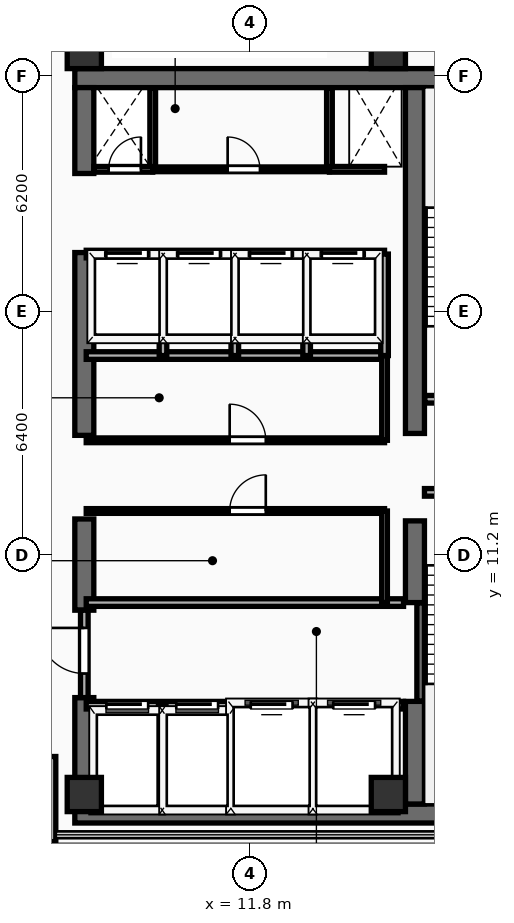
"""IFC4 building model, lengths in metres.
Left out: names, types, materials, properties, quantities, classifications, styles, units other than length and angle.
Written with IfcOpenShell. Run it as: python <this file> out.ifc"""

import sys

from ifc_helpers import new_model, si_unit, direction, frame, frame_2d, origin, origin_2d, place, context, subcontext, project, spatial, rectangle, extrude, element, fill, save


model = new_model("IFC4")
c1 = context("Model", 3, precision=1e-05, world=origin(), true_north=direction((0.0, 1.0)))
c2 = subcontext(c1, "Body", "Model", "MODEL_VIEW")
j1 = project(units=[si_unit("LENGTHUNIT", "METRE"), si_unit("PLANEANGLEUNIT", "RADIAN")], contexts=[c1])
p1 = place(None, origin())
s1 = spatial("IfcSite", under=j1, at=p1, CompositionType="ELEMENT")
p2 = place(p1, origin())
s2 = spatial("IfcBuilding", under=s1, at=p2, CompositionType="ELEMENT")
p3 = place(p2, frame((0.0, 0.0, 344.2)))
s3 = spatial("IfcBuildingStorey", under=s2, at=p3, CompositionType="ELEMENT", Elevation=344.2)
for number, where, z_axis, x_axis in (
    (1, (7.2, 4.4, 0.0), (0.0, 0.0, 1.0), (1.0, 0.0, 0.0)),
    (2, (7.2, 23.75, 0.0), (0.0, 0.0, 1.0), (1.0, 0.0, 0.0)),
):
    element("IfcWall", number, at=place(p3, frame(where, z_axis=z_axis, x_axis=x_axis)), inside=s3, PredefinedType="SHEAR", context=c2, shape_type="SweptSolid", body=[
        extrude(rectangle(XDim=13.85, YDim=0.5, at=frame_2d((6.925, 0.0))), origin(), (0.0, 0.0, 1.0), 3.66),
    ])
p4 = place(p3, frame((7.45, 4.65, 0.0), z_axis=(0.0, 0.0, 1.0), x_axis=(0.0, 1.0, 0.0)))
e3 = element("IfcWall", 3, at=p4, inside=s3, PredefinedType="SHEAR", context=c2, shape_type="SweptSolid", body=[
    extrude(rectangle(XDim=2.8, YDim=0.5, at=frame_2d((1.4, 0.0))), origin(), (0.0, 0.0, 1.0), 3.66),
])
p5 = place(p3, frame((7.45, 9.75, 0.0), z_axis=(0.0, 0.0, 1.0), x_axis=(0.0, 1.0, 0.0)))
e4 = element("IfcWall", 4, at=p5, inside=s3, PredefinedType="SHEAR", context=c2, shape_type="SweptSolid", body=[
    extrude(rectangle(XDim=2.4, YDim=0.5, at=frame_2d((1.2, 0.0))), origin(), (0.0, 0.0, 1.0), 3.66),
])
p6 = place(p3, frame((7.45, 14.35, 0.0), z_axis=(0.0, 0.0, 1.0), x_axis=(0.0, 1.0, 0.0)))
e5 = element("IfcWall", 5, at=p6, inside=s3, PredefinedType="SHEAR", context=c2, shape_type="SweptSolid", body=[
    extrude(rectangle(XDim=4.81, YDim=0.5, at=frame_2d((2.405, 0.0))), origin(), (0.0, 0.0, 1.0), 3.66),
])
p7 = place(p3, frame((7.45, 21.24, 0.0), z_axis=(0.0, 0.0, 1.0), x_axis=(0.0, 1.0, 0.0)))
e6 = element("IfcWall", 6, at=p7, inside=s3, PredefinedType="SHEAR", context=c2, shape_type="SweptSolid", body=[
    extrude(rectangle(XDim=2.26, YDim=0.5, at=frame_2d((1.13, 0.0))), origin(), (0.0, 0.0, 1.0), 3.66),
])
p8 = place(p3, frame((16.15, 4.65, 0.0), z_axis=(0.0, 0.0, 1.0), x_axis=(0.0, 1.0, 0.0)))
e7 = element("IfcWall", 7, at=p8, inside=s3, PredefinedType="SHEAR", context=c2, shape_type="SweptSolid", body=[
    extrude(rectangle(XDim=2.7, YDim=0.5, at=frame_2d((1.35, 0.0))), origin(), (0.0, 0.0, 1.0), 3.66),
])
p9 = place(p3, frame((16.15, 9.95, 0.0), z_axis=(0.0, 0.0, 1.0), x_axis=(0.0, 1.0, 0.0)))
e8 = element("IfcWall", 8, at=p9, inside=s3, PredefinedType="SHEAR", context=c2, shape_type="SweptSolid", body=[
    extrude(rectangle(XDim=2.15, YDim=0.5, at=frame_2d((1.075, 0.0))), origin(), (0.0, 0.0, 1.0), 3.66),
])
p10 = place(p3, frame((16.15, 14.4, 0.0), z_axis=(0.0, 0.0, 1.0), x_axis=(0.0, 1.0, 0.0)))
e9 = element("IfcWall", 9, at=p10, inside=s3, PredefinedType="SHEAR", context=c2, shape_type="SweptSolid", body=[
    extrude(rectangle(XDim=9.1, YDim=0.5, at=frame_2d((4.55, 0.0))), origin(), (0.0, 0.0, 1.0), 3.66),
])
for number, where, z_axis, x_axis in (
    (10, (7.45, 4.9, 0.0), (0.0, 0.0, 1.0), (1.0, 0.0, 0.0)),
    (11, (15.45, 4.9, 0.0), (0.0, 0.0, 1.0), (1.0, 0.0, 0.0)),
    (12, (7.45, 24.45, 0.0), (0.0, 0.0, 1.0), (1.0, 0.0, 0.0)),
    (13, (15.45, 24.45, 0.0), (0.0, 0.0, 1.0), (1.0, 0.0, 0.0)),
):
    element("IfcColumn", number, at=place(p3, frame(where, z_axis=z_axis, x_axis=x_axis)), inside=s3, PredefinedType="COLUMN", context=c2, shape_type="SweptSolid", body=[
        extrude(rectangle(XDim=0.9, YDim=0.9, at=origin_2d()), origin(), (0.0, 0.0, 1.0), 3.66),
    ])
p11 = place(p3, frame((6.56, 3.66, 0.0), z_axis=(0.0, 0.0, 1.0), x_axis=(0.0, 1.0, 0.0)))
e14 = element("IfcWall", 14, at=p11, inside=s3, PredefinedType="SOLIDWALL", context=c2, shape_type="SweptSolid", body=[
    extrude(rectangle(XDim=2.24, YDim=0.28, at=frame_2d((1.12, 0.0))), origin(), (0.0, 0.0, 1.0), 3.66),
])
p12 = place(p3, frame((16.3, 7.36, 0.0), z_axis=(0.0, 0.0, 1.0), x_axis=(0.0, 1.0, 0.0)))
e15 = element("IfcWall", 15, at=p12, inside=s3, PredefinedType="SHEAR", context=c2, shape_type="SweptSolid", body=[
    extrude(rectangle(XDim=2.58, YDim=0.2, at=frame_2d((1.29, 0.0))), origin(), (0.0, 0.0, 1.0), 3.66),
])
p13 = place(p3, frame((16.4, 12.85, 0.0), z_axis=(0.0, 0.0, 1.0), x_axis=(1.0, 0.0, 0.0)))
e16 = element("IfcWall", 16, at=p13, inside=s3, PredefinedType="PARTITIONING", context=c2, shape_type="SweptSolid", body=[
    extrude(rectangle(XDim=3.96, YDim=0.2, at=frame_2d((1.98, 0.0))), origin(), (0.0, 0.0, 1.0), 3.66),
])
p14 = place(p13, frame((1.304, 0.0, 0.0)))
e17 = element("IfcOpeningElement", 17, at=p14, cuts=e16, PredefinedType="OPENING", context=c2, shape_type="SweptSolid", body=[
    extrude(rectangle(XDim=1.1, YDim=2.2, at=frame_2d((0.55, 1.1))), frame((0.0, 0.11, 0.0), z_axis=(0.0, -1.0, 0.0), x_axis=(1.0, 0.0, 0.0)), (0.0, 0.0, 1.0), 0.22),
])
p15 = place(p3, frame((16.41, 15.3, 0.0), z_axis=(0.0, 0.0, 1.0), x_axis=(1.0, 0.0, 0.0)))
e18 = element("IfcWall", 18, at=p15, inside=s3, PredefinedType="PARTITIONING", context=c2, shape_type="SweptSolid", body=[
    extrude(rectangle(XDim=3.95, YDim=0.2, at=frame_2d((1.975, 0.0))), origin(), (0.0, 0.0, 1.0), 3.66),
])
p16 = place(p15, frame((1.294, 0.0, 0.0)))
e19 = element("IfcOpeningElement", 19, at=p16, cuts=e18, PredefinedType="OPENING", context=c2, shape_type="SweptSolid", body=[
    extrude(rectangle(XDim=1.1, YDim=2.2, at=frame_2d((0.55, 1.1))), frame((0.0, 0.11, 0.0), z_axis=(0.0, -1.0, 0.0), x_axis=(1.0, 0.0, 0.0)), (0.0, 0.0, 1.0), 0.22),
])
p17 = place(p3, frame((7.5, 7.25, 0.0), z_axis=(0.0, 0.0, 1.0), x_axis=(1.0, 0.0, 0.0)))
e20 = element("IfcWall", 20, at=p17, inside=s3, PredefinedType="PARTITIONING", context=c2, shape_type="SweptSolid", body=[
    extrude(rectangle(XDim=8.35, YDim=0.2, at=frame_2d((4.175, 0.0))), origin(), (0.0, 0.0, 1.0), 3.66),
])
p18 = place(p17, frame((0.53, 0.0, 0.0)))
e21 = element("IfcOpeningElement", 21, at=p18, cuts=e20, PredefinedType="OPENING", context=c2, shape_type="SweptSolid", body=[
    extrude(rectangle(XDim=1.1, YDim=2.2, at=frame_2d((0.55, 1.1))), frame((0.0, 0.11, 0.0), z_axis=(0.0, -1.0, 0.0), x_axis=(1.0, 0.0, 0.0)), (0.0, 0.0, 1.0), 0.22),
])
p19 = place(p17, frame((2.37, 0.0, 0.0)))
e22 = element("IfcOpeningElement", 22, at=p19, cuts=e20, PredefinedType="OPENING", context=c2, shape_type="SweptSolid", body=[
    extrude(rectangle(XDim=1.1, YDim=2.2, at=frame_2d((0.55, 1.1))), frame((0.0, 0.11, 0.0), z_axis=(0.0, -1.0, 0.0), x_axis=(1.0, 0.0, 0.0)), (0.0, 0.0, 1.0), 0.22),
])
p20 = place(p17, frame((4.33, 0.0, 0.0)))
e23 = element("IfcOpeningElement", 23, at=p20, cuts=e20, PredefinedType="OPENING", context=c2, shape_type="SweptSolid", body=[
    extrude(rectangle(XDim=1.1, YDim=2.2, at=frame_2d((0.55, 1.1))), frame((0.0, 0.11, 0.0), z_axis=(0.0, -1.0, 0.0), x_axis=(1.0, 0.0, 0.0)), (0.0, 0.0, 1.0), 0.22),
])
p21 = place(p17, frame((6.5, 0.0, 0.0)))
e24 = element("IfcOpeningElement", 24, at=p21, cuts=e20, PredefinedType="OPENING", context=c2, shape_type="SweptSolid", body=[
    extrude(rectangle(XDim=1.1, YDim=2.2, at=frame_2d((0.55, 1.1))), frame((0.0, 0.11, 0.0), z_axis=(0.0, -1.0, 0.0), x_axis=(1.0, 0.0, 0.0)), (0.0, 0.0, 1.0), 0.22),
])
p22 = place(p3, frame((7.5, 9.95, 0.0), z_axis=(0.0, 0.0, 1.0), x_axis=(1.0, 0.0, 0.0)))
e25 = element("IfcWall", 25, at=p22, inside=s3, PredefinedType="PARTITIONING", context=c2, shape_type="SweptSolid", body=[
    extrude(rectangle(XDim=8.35, YDim=0.2, at=frame_2d((4.175, 0.0))), origin(), (0.0, 0.0, 1.0), 3.66),
])
for number, where, z_axis, x_axis in (
    (26, (9.5, 4.45, 0.0), (0.0, 0.0, 1.0), (0.0, 1.0, 0.0)),
    (27, (11.36, 4.45, 0.0), (0.0, 0.0, 1.0), (0.0, 1.0, 0.0)),
    (28, (13.46, 4.45, 0.0), (0.0, 0.0, 1.0), (0.0, 1.0, 0.0)),
):
    element("IfcWall", number, at=place(p3, frame(where, z_axis=z_axis, x_axis=x_axis)), inside=s3, PredefinedType="PARTITIONING", context=c2, shape_type="SweptSolid", body=[
        extrude(rectangle(XDim=2.8, YDim=0.2, at=frame_2d((1.4, 0.0))), origin(), (0.0, 0.0, 1.0), 3.66),
    ])
p23 = place(p3, frame((7.45, 7.45, 0.0), z_axis=(0.0, 0.0, 1.0), x_axis=(0.0, 1.0, 0.0)))
e29 = element("IfcWall", 29, at=p23, inside=s3, PredefinedType="PARTITIONING", context=c2, shape_type="SweptSolid", body=[
    extrude(rectangle(XDim=2.3, YDim=0.2, at=frame_2d((1.15, 0.0))), origin(), (0.0, 0.0, 1.0), 2.64),
])
p24 = place(p23, frame((0.633, 0.0, 0.0)))
e30 = element("IfcOpeningElement", 30, at=p24, cuts=e29, PredefinedType="OPENING", context=c2, shape_type="SweptSolid", body=[
    extrude(rectangle(XDim=1.2, YDim=2.25, at=frame_2d((0.6, 1.125))), frame((0.0, 0.11, 0.0), z_axis=(0.0, -1.0, 0.0), x_axis=(1.0, 0.0, 0.0)), (0.0, 0.0, 1.0), 0.22),
])
p25 = place(p3, frame((7.5, 16.45, 0.0), z_axis=(0.0, 0.0, 1.0), x_axis=(1.0, 0.0, 0.0)))
e31 = element("IfcWall", 31, at=p25, inside=s3, PredefinedType="PARTITIONING", context=c2, shape_type="SweptSolid", body=[
    extrude(rectangle(XDim=7.85, YDim=0.2, at=frame_2d((3.925, 0.0))), origin(), (0.0, 0.0, 1.0), 3.66),
])
p26 = place(p3, frame((7.5, 12.36, 0.0), z_axis=(0.0, 0.0, 1.0), x_axis=(1.0, 0.0, 0.0)))
e32 = element("IfcWall", 32, at=p26, inside=s3, PredefinedType="PARTITIONING", context=c2, shape_type="SweptSolid", body=[
    extrude(rectangle(XDim=7.85, YDim=0.125, at=frame_2d((3.925, 0.0))), origin(), (0.0, 0.0, 1.0), 3.66),
])
p27 = place(p26, frame((3.775, 0.0, 0.0)))
e33 = element("IfcOpeningElement", 33, at=p27, cuts=e32, PredefinedType="OPENING", context=c2, shape_type="SweptSolid", body=[
    extrude(rectangle(XDim=0.95, YDim=2.15, at=frame_2d((0.475, 1.075))), frame((0.0, 0.073, 0.0), z_axis=(0.0, -1.0, 0.0), x_axis=(1.0, 0.0, 0.0)), (0.0, 0.0, 1.0), 0.145),
])
p28 = place(p3, frame((7.5, 14.22, 0.0), z_axis=(0.0, 0.0, 1.0), x_axis=(1.0, 0.0, 0.0)))
e34 = element("IfcWall", 34, at=p28, inside=s3, PredefinedType="PARTITIONING", context=c2, shape_type="SweptSolid", body=[
    extrude(rectangle(XDim=7.85, YDim=0.125, at=frame_2d((3.925, 0.0))), origin(), (0.0, 0.0, 1.0), 3.66),
])
p29 = place(p28, frame((3.775, 0.0, 0.0)))
e35 = element("IfcOpeningElement", 35, at=p29, cuts=e34, PredefinedType="OPENING", context=c2, shape_type="SweptSolid", body=[
    extrude(rectangle(XDim=0.95, YDim=2.15, at=frame_2d((0.475, 1.075))), frame((0.0, 0.073, 0.0), z_axis=(0.0, -1.0, 0.0), x_axis=(1.0, 0.0, 0.0)), (0.0, 0.0, 1.0), 0.145),
])
p30 = place(p3, frame((15.35, 9.95, 0.0), z_axis=(0.0, 0.0, 1.0), x_axis=(0.0, 1.0, 0.0)))
e36 = element("IfcWall", 36, at=p30, inside=s3, PredefinedType="PARTITIONING", context=c2, shape_type="SweptSolid", body=[
    extrude(rectangle(XDim=2.41, YDim=0.15, at=frame_2d((1.205, 0.0))), origin(), (0.0, 0.0, 1.0), 3.66),
])
p31 = place(p3, frame((15.35, 14.22, 0.0), z_axis=(0.0, 0.0, 1.0), x_axis=(0.0, 1.0, 0.0)))
e37 = element("IfcWall", 37, at=p31, inside=s3, PredefinedType="PARTITIONING", context=c2, shape_type="SweptSolid", body=[
    extrude(rectangle(XDim=2.23, YDim=0.15, at=frame_2d((1.115, 0.0))), origin(), (0.0, 0.0, 1.0), 3.66),
])
p32 = place(p3, frame((7.5, 19.12, 0.0), z_axis=(0.0, 0.0, 1.0), x_axis=(1.0, 0.0, 0.0)))
e38 = element("IfcWall", 38, at=p32, inside=s3, PredefinedType="PARTITIONING", context=c2, shape_type="SweptSolid", body=[
    extrude(rectangle(XDim=7.85, YDim=0.2, at=frame_2d((3.925, 0.0))), origin(), (0.0, 0.0, 1.0), 3.66),
])
p33 = place(p32, frame((0.53, 0.0, 0.0)))
e39 = element("IfcOpeningElement", 39, at=p33, cuts=e38, PredefinedType="OPENING", context=c2, shape_type="SweptSolid", body=[
    extrude(rectangle(XDim=1.1, YDim=2.2, at=frame_2d((0.55, 1.1))), frame((0.0, 0.11, 0.0), z_axis=(0.0, -1.0, 0.0), x_axis=(1.0, 0.0, 0.0)), (0.0, 0.0, 1.0), 0.22),
])
p34 = place(p32, frame((2.42, 0.0, 0.0)))
e40 = element("IfcOpeningElement", 40, at=p34, cuts=e38, PredefinedType="OPENING", context=c2, shape_type="SweptSolid", body=[
    extrude(rectangle(XDim=1.1, YDim=2.2, at=frame_2d((0.55, 1.1))), frame((0.0, 0.11, 0.0), z_axis=(0.0, -1.0, 0.0), x_axis=(1.0, 0.0, 0.0)), (0.0, 0.0, 1.0), 0.22),
])
p35 = place(p32, frame((4.31, 0.0, 0.0)))
e41 = element("IfcOpeningElement", 41, at=p35, cuts=e38, PredefinedType="OPENING", context=c2, shape_type="SweptSolid", body=[
    extrude(rectangle(XDim=1.1, YDim=2.2, at=frame_2d((0.55, 1.1))), frame((0.0, 0.11, 0.0), z_axis=(0.0, -1.0, 0.0), x_axis=(1.0, 0.0, 0.0)), (0.0, 0.0, 1.0), 0.22),
])
p36 = place(p32, frame((6.2, 0.0, 0.0)))
e42 = element("IfcOpeningElement", 42, at=p36, cuts=e38, PredefinedType="OPENING", context=c2, shape_type="SweptSolid", body=[
    extrude(rectangle(XDim=1.1, YDim=2.2, at=frame_2d((0.55, 1.1))), frame((0.0, 0.11, 0.0), z_axis=(0.0, -1.0, 0.0), x_axis=(1.0, 0.0, 0.0)), (0.0, 0.0, 1.0), 0.22),
])
for number, where, z_axis, x_axis in (
    (43, (15.35, 16.45, 0.0), (0.0, 0.0, 1.0), (0.0, 1.0, 0.0)),
    (44, (9.52, 16.45, 0.0), (0.0, 0.0, 1.0), (0.0, 1.0, 0.0)),
    (45, (11.41, 16.45, 0.0), (0.0, 0.0, 1.0), (0.0, 1.0, 0.0)),
    (46, (13.3, 16.45, 0.0), (0.0, 0.0, 1.0), (0.0, 1.0, 0.0)),
):
    element("IfcWall", number, at=place(p3, frame(where, z_axis=z_axis, x_axis=x_axis)), inside=s3, PredefinedType="PARTITIONING", context=c2, shape_type="SweptSolid", body=[
        extrude(rectangle(XDim=2.67, YDim=0.2, at=frame_2d((1.335, 0.0))), origin(), (0.0, 0.0, 1.0), 3.66),
    ])
for number, where, z_axis, x_axis in (
    (47, (9.25, 21.35, 0.0), (0.0, 0.0, 1.0), (0.0, 1.0, 0.0)),
    (48, (13.9, 21.35, 0.0), (0.0, 0.0, 1.0), (0.0, 1.0, 0.0)),
):
    element("IfcWall", number, at=place(p3, frame(where, z_axis=z_axis, x_axis=x_axis)), inside=s3, PredefinedType="PARTITIONING", context=c2, shape_type="SweptSolid", body=[
        extrude(rectangle(XDim=2.13, YDim=0.15, at=frame_2d((1.065, 0.0))), origin(), (0.0, 0.0, 1.0), 3.66),
    ])
p37 = place(p3, frame((7.7, 21.35, 0.0), z_axis=(0.0, 0.0, 1.0), x_axis=(1.0, 0.0, 0.0)))
e49 = element("IfcWall", 49, at=p37, inside=s3, PredefinedType="PARTITIONING", context=c2, shape_type="SweptSolid", body=[
    extrude(rectangle(XDim=1.55, YDim=0.15, at=frame_2d((0.775, 0.0))), origin(), (0.0, 0.0, 1.0), 3.66),
])
p38 = place(p37, frame((0.39, 0.0, 0.0)))
e50 = element("IfcOpeningElement", 50, at=p38, cuts=e49, PredefinedType="OPENING", context=c2, shape_type="SweptSolid", body=[
    extrude(rectangle(XDim=0.85, YDim=2.15, at=frame_2d((0.425, 1.075))), frame((0.0, 0.085, 0.0), z_axis=(0.0, -1.0, 0.0), x_axis=(1.0, 0.0, 0.0)), (0.0, 0.0, 1.0), 0.17),
])
p39 = place(p3, frame((13.9, 21.35, 0.0), z_axis=(0.0, 0.0, 1.0), x_axis=(1.0, 0.0, 0.0)))
e51 = element("IfcWall", 51, at=p39, inside=s3, PredefinedType="PARTITIONING", context=c2, shape_type="SweptSolid", body=[
    extrude(rectangle(XDim=1.45, YDim=0.15, at=frame_2d((0.725, 0.0))), origin(), (0.0, 0.0, 1.0), 3.66),
])
p40 = place(p3, frame((9.25, 21.35, 0.0), z_axis=(0.0, 0.0, 1.0), x_axis=(1.0, 0.0, 0.0)))
e52 = element("IfcWall", 52, at=p40, inside=s3, PredefinedType="PARTITIONING", context=c2, shape_type="SweptSolid", body=[
    extrude(rectangle(XDim=4.65, YDim=0.125, at=frame_2d((2.325, 0.0))), origin(), (0.0, 0.0, 1.0), 3.66),
])
p41 = place(p40, frame((1.971, 0.0, 0.0)))
e53 = element("IfcOpeningElement", 53, at=p41, cuts=e52, PredefinedType="OPENING", context=c2, shape_type="SweptSolid", body=[
    extrude(rectangle(XDim=0.85, YDim=2.15, at=frame_2d((0.425, 1.075))), frame((0.0, 0.073, 0.0), z_axis=(0.0, -1.0, 0.0), x_axis=(1.0, 0.0, 0.0)), (0.0, 0.0, 1.0), 0.145),
])
p42 = place(p18, origin())
e54 = element("IfcDoor", 54, at=p42, inside=s3, OperationType="SLIDING_TO_LEFT", PredefinedType="DOOR", context=c2, shape_type="SweptSolid", body=[
    extrude(rectangle(XDim=1.1, YDim=2.2, at=frame_2d((0.55, 1.1))), frame((0.0, 0.025, 0.0), z_axis=(0.0, -1.0, 0.0), x_axis=(1.0, 0.0, 0.0)), (0.0, 0.0, 1.0), 0.05),
])
fill(e21, e54)
p43 = place(p19, origin())
e55 = element("IfcDoor", 55, at=p43, inside=s3, OperationType="SLIDING_TO_LEFT", PredefinedType="DOOR", context=c2, shape_type="SweptSolid", body=[
    extrude(rectangle(XDim=1.1, YDim=2.2, at=frame_2d((0.55, 1.1))), frame((0.0, 0.025, 0.0), z_axis=(0.0, -1.0, 0.0), x_axis=(1.0, 0.0, 0.0)), (0.0, 0.0, 1.0), 0.05),
])
fill(e22, e55)
p44 = place(p20, origin())
e56 = element("IfcDoor", 56, at=p44, inside=s3, OperationType="SLIDING_TO_LEFT", PredefinedType="DOOR", context=c2, shape_type="SweptSolid", body=[
    extrude(rectangle(XDim=1.1, YDim=2.2, at=frame_2d((0.55, 1.1))), frame((0.0, 0.025, 0.0), z_axis=(0.0, -1.0, 0.0), x_axis=(1.0, 0.0, 0.0)), (0.0, 0.0, 1.0), 0.05),
])
fill(e23, e56)
p45 = place(p21, origin())
e57 = element("IfcDoor", 57, at=p45, inside=s3, OperationType="SLIDING_TO_LEFT", PredefinedType="DOOR", context=c2, shape_type="SweptSolid", body=[
    extrude(rectangle(XDim=1.1, YDim=2.2, at=frame_2d((0.55, 1.1))), frame((0.0, 0.025, 0.0), z_axis=(0.0, -1.0, 0.0), x_axis=(1.0, 0.0, 0.0)), (0.0, 0.0, 1.0), 0.05),
])
fill(e24, e57)
p46 = place(p24, frame((1.2, 0.0, 0.0), z_axis=(0.0, 0.0, 1.0), x_axis=(-1.0, 0.0, 0.0)))
e58 = element("IfcDoor", 58, at=p46, inside=s3, OperationType="SINGLE_SWING_LEFT", PredefinedType="DOOR", context=c2, shape_type="SweptSolid", body=[
    extrude(rectangle(XDim=1.2, YDim=2.25, at=frame_2d((0.6, 1.125))), frame((0.0, 0.025, 0.0), z_axis=(0.0, -1.0, 0.0), x_axis=(1.0, 0.0, 0.0)), (0.0, 0.0, 1.0), 0.05),
])
fill(e30, e58)
p47 = place(p27, origin())
e59 = element("IfcDoor", 59, at=p47, inside=s3, OperationType="SINGLE_SWING_RIGHT", PredefinedType="DOOR", context=c2, shape_type="SweptSolid", body=[
    extrude(rectangle(XDim=0.95, YDim=2.15, at=frame_2d((0.475, 1.075))), frame((0.0, 0.025, 0.0), z_axis=(0.0, -1.0, 0.0), x_axis=(1.0, 0.0, 0.0)), (0.0, 0.0, 1.0), 0.05),
])
fill(e33, e59)
p48 = place(p29, origin())
e60 = element("IfcDoor", 60, at=p48, inside=s3, OperationType="SINGLE_SWING_LEFT", PredefinedType="DOOR", context=c2, shape_type="SweptSolid", body=[
    extrude(rectangle(XDim=0.95, YDim=2.15, at=frame_2d((0.475, 1.075))), frame((0.0, 0.025, 0.0), z_axis=(0.0, -1.0, 0.0), x_axis=(1.0, 0.0, 0.0)), (0.0, 0.0, 1.0), 0.05),
])
fill(e35, e60)
p49 = place(p33, origin())
e61 = element("IfcDoor", 61, at=p49, inside=s3, OperationType="SLIDING_TO_LEFT", PredefinedType="DOOR", context=c2, shape_type="SweptSolid", body=[
    extrude(rectangle(XDim=1.1, YDim=2.2, at=frame_2d((0.55, 1.1))), frame((0.0, 0.025, 0.0), z_axis=(0.0, -1.0, 0.0), x_axis=(1.0, 0.0, 0.0)), (0.0, 0.0, 1.0), 0.05),
])
fill(e39, e61)
p50 = place(p34, origin())
e62 = element("IfcDoor", 62, at=p50, inside=s3, OperationType="SLIDING_TO_LEFT", PredefinedType="DOOR", context=c2, shape_type="SweptSolid", body=[
    extrude(rectangle(XDim=1.1, YDim=2.2, at=frame_2d((0.55, 1.1))), frame((0.0, 0.025, 0.0), z_axis=(0.0, -1.0, 0.0), x_axis=(1.0, 0.0, 0.0)), (0.0, 0.0, 1.0), 0.05),
])
fill(e40, e62)
p51 = place(p35, origin())
e63 = element("IfcDoor", 63, at=p51, inside=s3, OperationType="SLIDING_TO_LEFT", PredefinedType="DOOR", context=c2, shape_type="SweptSolid", body=[
    extrude(rectangle(XDim=1.1, YDim=2.2, at=frame_2d((0.55, 1.1))), frame((0.0, 0.025, 0.0), z_axis=(0.0, -1.0, 0.0), x_axis=(1.0, 0.0, 0.0)), (0.0, 0.0, 1.0), 0.05),
])
fill(e41, e63)
p52 = place(p36, origin())
e64 = element("IfcDoor", 64, at=p52, inside=s3, OperationType="SLIDING_TO_LEFT", PredefinedType="DOOR", context=c2, shape_type="SweptSolid", body=[
    extrude(rectangle(XDim=1.1, YDim=2.2, at=frame_2d((0.55, 1.1))), frame((0.0, 0.025, 0.0), z_axis=(0.0, -1.0, 0.0), x_axis=(1.0, 0.0, 0.0)), (0.0, 0.0, 1.0), 0.05),
])
fill(e42, e64)
p53 = place(p38, origin())
e65 = element("IfcDoor", 65, at=p53, inside=s3, OperationType="SINGLE_SWING_RIGHT", PredefinedType="DOOR", context=c2, shape_type="SweptSolid", body=[
    extrude(rectangle(XDim=0.85, YDim=2.15, at=frame_2d((0.425, 1.075))), frame((0.0, 0.025, 0.0), z_axis=(0.0, -1.0, 0.0), x_axis=(1.0, 0.0, 0.0)), (0.0, 0.0, 1.0), 0.05),
])
fill(e50, e65)
p54 = place(p41, origin())
e66 = element("IfcDoor", 66, at=p54, inside=s3, OperationType="SINGLE_SWING_LEFT", PredefinedType="DOOR", context=c2, shape_type="SweptSolid", body=[
    extrude(rectangle(XDim=0.85, YDim=2.15, at=frame_2d((0.425, 1.075))), frame((0.0, 0.025, 0.0), z_axis=(0.0, -1.0, 0.0), x_axis=(1.0, 0.0, 0.0)), (0.0, 0.0, 1.0), 0.05),
])
fill(e53, e66)
save(model, sys.argv[1])
